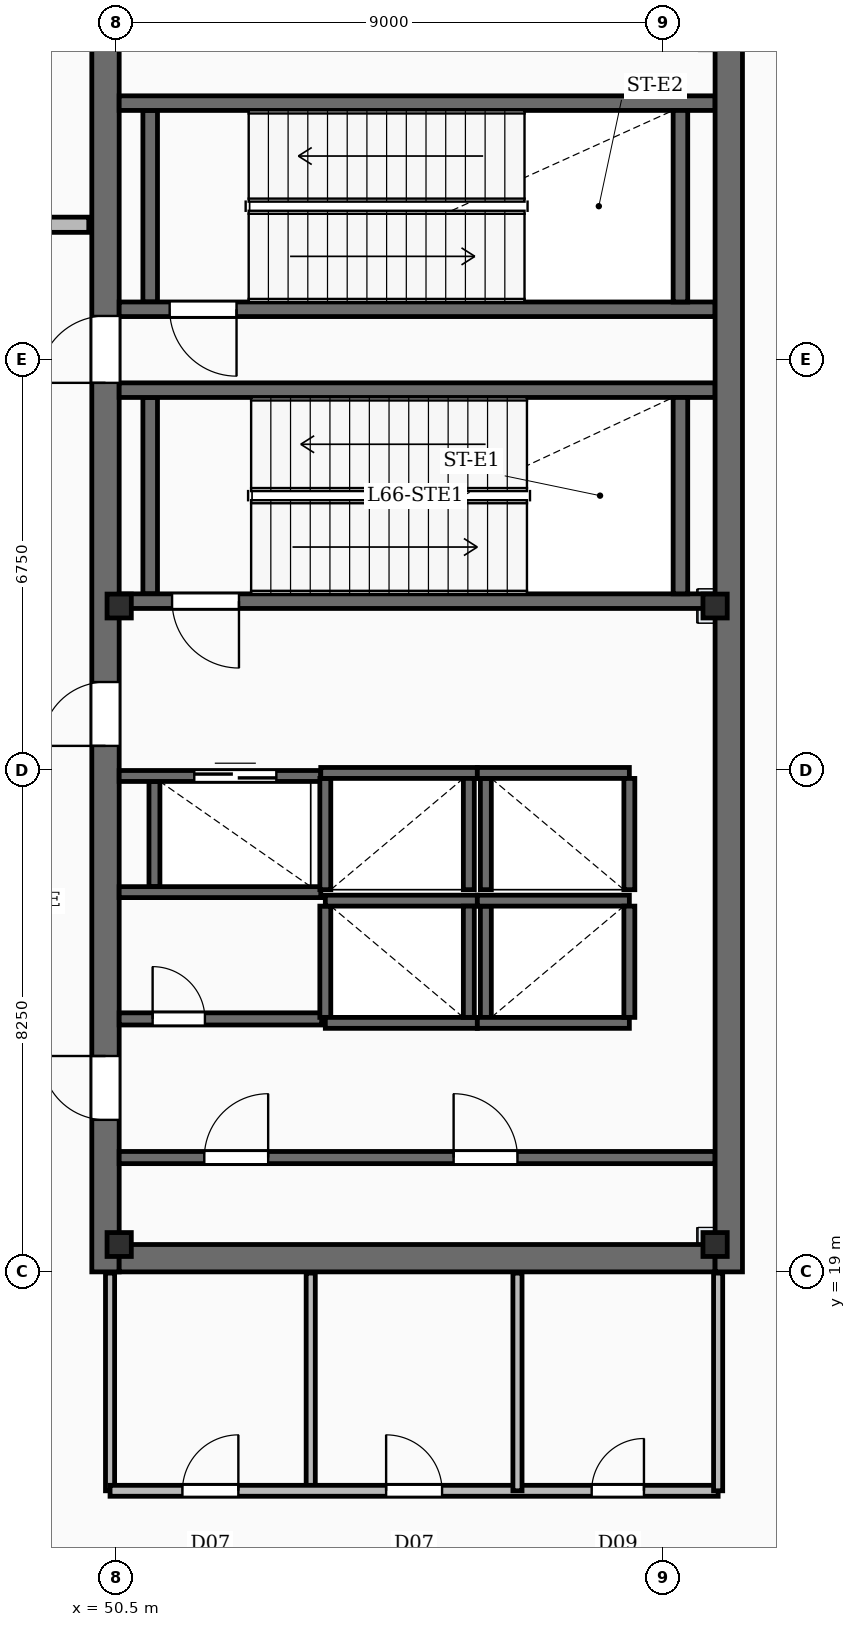
"""IFC4 building model, lengths in metres.
Left out: names, types, materials, properties, quantities, classifications, styles, units other than length and angle.
Written with IfcOpenShell. Run it as: python <this file> out.ifc"""

import sys

from ifc_helpers import new_model, si_unit, direction, frame, frame_2d, origin, origin_2d, place, context, subcontext, project, spatial, rectangle, i_section, extrude, element, fill, save


model = new_model("IFC4")
c1 = context("Model", 3, precision=1e-05, world=origin(), true_north=direction((0.0, 1.0)))
c2 = subcontext(c1, "Body", "Model", "MODEL_VIEW")
j1 = project(units=[si_unit("LENGTHUNIT", "METRE"), si_unit("PLANEANGLEUNIT", "RADIAN")], contexts=[c1])
p1 = place(None, origin())
s1 = spatial("IfcSite", under=j1, at=p1, CompositionType="ELEMENT")
p2 = place(p1, origin())
s2 = spatial("IfcBuilding", under=s1, at=p2, CompositionType="ELEMENT")
p3 = place(p2, frame((0.0, 0.0, 269.7)))
s3 = spatial("IfcBuildingStorey", under=s2, at=p3, CompositionType="ELEMENT", Elevation=269.7)
p4 = place(p3, frame((50.325, 19.0, -0.42), z_axis=(0.0, 0.0, 1.0), x_axis=(0.0, 1.0, 0.0)))
e1 = element("IfcWall", 1, at=p4, inside=s3, PredefinedType="SHEAR", context=c2, shape_type="SweptSolid", body=[
    extrude(rectangle(XDim=20.8, YDim=0.45, at=frame_2d((10.4, 0.0))), origin(), (0.0, 0.0, 1.0), 5.17),
])
p5 = place(p4, frame((2.5, 0.0, 0.42)))
e2 = element("IfcOpeningElement", 2, at=p5, cuts=e1, PredefinedType="OPENING", context=c2, shape_type="SweptSolid", body=[
    extrude(rectangle(XDim=1.05, YDim=2.15, at=frame_2d((0.525, 1.075))), frame((0.0, 0.235, 0.0), z_axis=(0.0, -1.0, 0.0), x_axis=(1.0, 0.0, 0.0)), (0.0, 0.0, 1.0), 0.47),
])
p6 = place(p4, frame((8.65, 0.0, 0.42)))
e3 = element("IfcOpeningElement", 3, at=p6, cuts=e1, PredefinedType="OPENING", context=c2, shape_type="SweptSolid", body=[
    extrude(rectangle(XDim=1.05, YDim=2.15, at=frame_2d((0.525, 1.075))), frame((0.0, 0.235, 0.0), z_axis=(0.0, -1.0, 0.0), x_axis=(1.0, 0.0, 0.0)), (0.0, 0.0, 1.0), 0.47),
])
p7 = place(p4, frame((14.62, 0.0, 0.42)))
e4 = element("IfcOpeningElement", 4, at=p7, cuts=e1, PredefinedType="OPENING", context=c2, shape_type="SweptSolid", body=[
    extrude(rectangle(XDim=1.1, YDim=2.15, at=frame_2d((0.55, 1.075))), frame((0.0, 0.235, 0.0), z_axis=(0.0, -1.0, 0.0), x_axis=(1.0, 0.0, 0.0)), (0.0, 0.0, 1.0), 0.47),
])
p8 = place(p3, frame((60.575, 19.0, -0.42), z_axis=(0.0, 0.0, 1.0), x_axis=(0.0, 1.0, 0.0)))
e5 = element("IfcWall", 5, at=p8, inside=s3, PredefinedType="SHEAR", context=c2, shape_type="SweptSolid", body=[
    extrude(rectangle(XDim=20.8, YDim=0.45, at=frame_2d((10.4, 0.0))), origin(), (0.0, 0.0, 1.0), 5.17),
])
p9 = place(p3, frame((50.55, 19.225, -0.42), z_axis=(0.0, 0.0, 1.0), x_axis=(1.0, 0.0, 0.0)))
e6 = element("IfcWall", 6, at=p9, inside=s3, PredefinedType="SHEAR", context=c2, shape_type="SweptSolid", body=[
    extrude(rectangle(XDim=9.8, YDim=0.45, at=frame_2d((4.9, 0.0))), origin(), (0.0, 0.0, 1.0), 5.17),
])
for number, where, z_axis, x_axis in (
    (7, (50.55, 19.45, -0.42), (0.0, 0.0, 1.0), (1.0, 0.0, 0.0)),
    (8, (60.35, 19.45, -0.42), (0.0, 0.0, 1.0), (1.0, 0.0, 0.0)),
    (9, (50.55, 29.95, -0.42), (0.0, 0.0, 1.0), (1.0, 0.0, 0.0)),
    (10, (60.35, 29.95, -0.42), (0.0, 0.0, 1.0), (1.0, 0.0, 0.0)),
):
    element("IfcColumn", number, at=place(p3, frame(where, z_axis=z_axis, x_axis=x_axis)), inside=s3, PredefinedType="COLUMN", context=c2, shape_type="SweptSolid", body=[
        extrude(i_section(OverallWidth=0.399, OverallDepth=0.393, WebThickness=0.023, FlangeThickness=0.037, FilletRadius=0.02, at=origin_2d()), origin(), (0.0, 0.0, 1.0), 5.17),
    ])
p10 = place(p3, frame((60.35, 30.03, 0.0), z_axis=(0.0, 0.0, 1.0), x_axis=(-1.0, 0.0, 0.0)))
e11 = element("IfcWall", 11, at=p10, inside=s3, PredefinedType="SOLIDWALL", context=c2, shape_type="SweptSolid", body=[
    extrude(rectangle(XDim=9.8, YDim=0.24, at=frame_2d((4.9, 0.0))), origin(), (0.0, 0.0, 1.0), 4.75),
])
p11 = place(p10, frame((7.83, 0.0, 0.0)))
e12 = element("IfcOpeningElement", 12, at=p11, cuts=e11, PredefinedType="OPENING", context=c2, shape_type="SweptSolid", body=[
    extrude(rectangle(XDim=1.1, YDim=2.15, at=frame_2d((0.55, 1.075))), frame((0.0, 0.13, 0.0), z_axis=(0.0, -1.0, 0.0), x_axis=(1.0, 0.0, 0.0)), (0.0, 0.0, 1.0), 0.26),
])
p12 = place(p3, frame((50.55, 33.5, 0.0), z_axis=(0.0, 0.0, 1.0), x_axis=(1.0, 0.0, 0.0)))
e13 = element("IfcWall", 13, at=p12, inside=s3, PredefinedType="SOLIDWALL", context=c2, shape_type="SweptSolid", body=[
    extrude(rectangle(XDim=9.8, YDim=0.24, at=frame_2d((4.9, 0.0))), origin(), (0.0, 0.0, 1.0), 4.75),
])
for number, where, z_axis, x_axis in (
    (14, (51.06, 30.15, 0.0), (0.0, 0.0, 1.0), (0.0, 1.0, 0.0)),
    (15, (59.78, 30.15, 0.0), (0.0, 0.0, 1.0), (0.0, 1.0, 0.0)),
):
    element("IfcWall", number, at=place(p3, frame(where, z_axis=z_axis, x_axis=x_axis)), inside=s3, PredefinedType="SOLIDWALL", context=c2, shape_type="SweptSolid", body=[
        extrude(rectangle(XDim=3.23, YDim=0.24, at=frame_2d((1.615, 0.0))), origin(), (0.0, 0.0, 1.0), 4.75),
    ])
p13 = place(p3, frame((60.35, 34.83, 0.0), z_axis=(0.0, 0.0, 1.0), x_axis=(-1.0, 0.0, 0.0)))
e16 = element("IfcWall", 16, at=p13, inside=s3, PredefinedType="SOLIDWALL", context=c2, shape_type="SweptSolid", body=[
    extrude(rectangle(XDim=9.8, YDim=0.24, at=frame_2d((4.9, 0.0))), origin(), (0.0, 0.0, 1.0), 4.75),
])
p14 = place(p13, frame((7.87, 0.0, 0.0)))
e17 = element("IfcOpeningElement", 17, at=p14, cuts=e16, PredefinedType="OPENING", context=c2, shape_type="SweptSolid", body=[
    extrude(rectangle(XDim=1.1, YDim=2.15, at=frame_2d((0.55, 1.075))), frame((0.0, 0.13, 0.0), z_axis=(0.0, -1.0, 0.0), x_axis=(1.0, 0.0, 0.0)), (0.0, 0.0, 1.0), 0.26),
])
p15 = place(p3, frame((50.55, 38.22, 0.0), z_axis=(0.0, 0.0, 1.0), x_axis=(1.0, 0.0, 0.0)))
e18 = element("IfcWall", 18, at=p15, inside=s3, PredefinedType="SOLIDWALL", context=c2, shape_type="SweptSolid", body=[
    extrude(rectangle(XDim=9.8, YDim=0.24, at=frame_2d((4.9, 0.0))), origin(), (0.0, 0.0, 1.0), 4.75),
])
for number, where, z_axis, x_axis in (
    (19, (51.06, 34.95, 0.0), (0.0, 0.0, 1.0), (0.0, 1.0, 0.0)),
    (20, (59.78, 34.95, 0.0), (0.0, 0.0, 1.0), (0.0, 1.0, 0.0)),
):
    element("IfcWall", number, at=place(p3, frame(where, z_axis=z_axis, x_axis=x_axis)), inside=s3, PredefinedType="SOLIDWALL", context=c2, shape_type="SweptSolid", body=[
        extrude(rectangle(XDim=3.15, YDim=0.24, at=frame_2d((1.575, 0.0))), origin(), (0.0, 0.0, 1.0), 4.75),
    ])
for number, where, z_axis, x_axis in (
    (21, (53.94, 25.105, 0.0), (0.0, 0.0, 1.0), (1.0, 0.0, 0.0)),
    (22, (53.94, 23.095, 0.0), (0.0, 0.0, 1.0), (1.0, 0.0, 0.0)),
):
    element("IfcWall", number, at=place(p3, frame(where, z_axis=z_axis, x_axis=x_axis)), inside=s3, PredefinedType="SOLIDWALL", context=c2, shape_type="SweptSolid", body=[
        extrude(rectangle(XDim=2.5, YDim=0.18, at=frame_2d((1.25, 0.0))), origin(), (0.0, 0.0, 1.0), 4.75),
    ])
for number, where, z_axis, x_axis in (
    (23, (53.94, 23.185, 0.0), (0.0, 0.0, 1.0), (0.0, 1.0, 0.0)),
    (24, (56.3, 23.185, 0.0), (0.0, 0.0, 1.0), (0.0, 1.0, 0.0)),
):
    element("IfcWall", number, at=place(p3, frame(where, z_axis=z_axis, x_axis=x_axis)), inside=s3, PredefinedType="SOLIDWALL", context=c2, shape_type="SweptSolid", body=[
        extrude(rectangle(XDim=1.83, YDim=0.18, at=frame_2d((0.915, 0.0))), origin(), (0.0, 0.0, 1.0), 4.75),
    ])
for number, where, z_axis, x_axis in (
    (25, (56.44, 25.105, 0.0), (0.0, 0.0, 1.0), (1.0, 0.0, 0.0)),
    (26, (56.44, 23.095, 0.0), (0.0, 0.0, 1.0), (1.0, 0.0, 0.0)),
):
    element("IfcWall", number, at=place(p3, frame(where, z_axis=z_axis, x_axis=x_axis)), inside=s3, PredefinedType="SOLIDWALL", context=c2, shape_type="SweptSolid", body=[
        extrude(rectangle(XDim=2.5, YDim=0.18, at=frame_2d((1.25, 0.0))), origin(), (0.0, 0.0, 1.0), 4.75),
    ])
for number, where, z_axis, x_axis in (
    (27, (56.58, 23.185, 0.0), (0.0, 0.0, 1.0), (0.0, 1.0, 0.0)),
    (28, (58.94, 23.185, 0.0), (0.0, 0.0, 1.0), (0.0, 1.0, 0.0)),
):
    element("IfcWall", number, at=place(p3, frame(where, z_axis=z_axis, x_axis=x_axis)), inside=s3, PredefinedType="SOLIDWALL", context=c2, shape_type="SweptSolid", body=[
        extrude(rectangle(XDim=1.83, YDim=0.18, at=frame_2d((0.915, 0.0))), origin(), (0.0, 0.0, 1.0), 4.75),
    ])
p16 = place(p3, frame((53.865, 27.205, 0.0), z_axis=(0.0, 0.0, 1.0), x_axis=(1.0, 0.0, 0.0)))
e29 = element("IfcWall", 29, at=p16, inside=s3, PredefinedType="SOLIDWALL", context=c2, shape_type="SweptSolid", body=[
    extrude(rectangle(XDim=2.575, YDim=0.18, at=frame_2d((1.288, 0.0))), origin(), (0.0, 0.0, 1.0), 4.75),
])
for number, where, z_axis, x_axis in (
    (30, (53.94, 25.285, 0.0), (0.0, 0.0, 1.0), (0.0, 1.0, 0.0)),
    (31, (56.3, 25.285, 0.0), (0.0, 0.0, 1.0), (0.0, 1.0, 0.0)),
):
    element("IfcWall", number, at=place(p3, frame(where, z_axis=z_axis, x_axis=x_axis)), inside=s3, PredefinedType="SOLIDWALL", context=c2, shape_type="SweptSolid", body=[
        extrude(rectangle(XDim=1.83, YDim=0.18, at=frame_2d((0.915, 0.0))), origin(), (0.0, 0.0, 1.0), 4.75),
    ])
p17 = place(p3, frame((56.44, 27.205, 0.0), z_axis=(0.0, 0.0, 1.0), x_axis=(1.0, 0.0, 0.0)))
e32 = element("IfcWall", 32, at=p17, inside=s3, PredefinedType="SOLIDWALL", context=c2, shape_type="SweptSolid", body=[
    extrude(rectangle(XDim=2.5, YDim=0.18, at=frame_2d((1.25, 0.0))), origin(), (0.0, 0.0, 1.0), 4.75),
])
for number, where, z_axis, x_axis in (
    (33, (56.58, 25.285, 0.0), (0.0, 0.0, 1.0), (0.0, 1.0, 0.0)),
    (34, (58.94, 25.285, 0.0), (0.0, 0.0, 1.0), (0.0, 1.0, 0.0)),
):
    element("IfcWall", number, at=place(p3, frame(where, z_axis=z_axis, x_axis=x_axis)), inside=s3, PredefinedType="SOLIDWALL", context=c2, shape_type="SweptSolid", body=[
        extrude(rectangle(XDim=1.83, YDim=0.18, at=frame_2d((0.915, 0.0))), origin(), (0.0, 0.0, 1.0), 4.75),
    ])
p18 = place(p3, frame((50.55, 27.155, 0.0), z_axis=(0.0, 0.0, 1.0), x_axis=(1.0, 0.0, 0.0)))
e35 = element("IfcWall", 35, at=p18, inside=s3, PredefinedType="SOLIDWALL", context=c2, shape_type="SweptSolid", body=[
    extrude(rectangle(XDim=3.315, YDim=0.18, at=frame_2d((1.657, 0.0))), origin(), (0.0, 0.0, 1.0), 4.75),
])
p19 = place(p18, frame((1.235, 0.0, 0.0)))
e36 = element("IfcOpeningElement", 36, at=p19, cuts=e35, PredefinedType="OPENING", context=c2, shape_type="SweptSolid", body=[
    extrude(rectangle(XDim=1.35, YDim=2.3, at=frame_2d((0.675, 1.15))), frame((0.0, 0.1, 0.0), z_axis=(0.0, -1.0, 0.0), x_axis=(1.0, 0.0, 0.0)), (0.0, 0.0, 1.0), 0.2),
])
p20 = place(p3, frame((50.55, 25.245, 0.0), z_axis=(0.0, 0.0, 1.0), x_axis=(1.0, 0.0, 0.0)))
e37 = element("IfcWall", 37, at=p20, inside=s3, PredefinedType="SOLIDWALL", context=c2, shape_type="SweptSolid", body=[
    extrude(rectangle(XDim=3.315, YDim=0.18, at=frame_2d((1.657, 0.0))), origin(), (0.0, 0.0, 1.0), 4.75),
])
p21 = place(p3, frame((51.13, 25.335, 0.0), z_axis=(0.0, 0.0, 1.0), x_axis=(0.0, 1.0, 0.0)))
e38 = element("IfcWall", 38, at=p21, inside=s3, PredefinedType="SOLIDWALL", context=c2, shape_type="SweptSolid", body=[
    extrude(rectangle(XDim=1.73, YDim=0.18, at=frame_2d((0.865, 0.0))), origin(), (0.0, 0.0, 1.0), 4.75),
])
p22 = place(p3, frame((50.55, 20.88, 0.0), z_axis=(0.0, 0.0, 1.0), x_axis=(1.0, 0.0, 0.0)))
e39 = element("IfcWall", 39, at=p22, inside=s3, PredefinedType="SOLIDWALL", context=c2, shape_type="SweptSolid", body=[
    extrude(rectangle(XDim=9.8, YDim=0.2, at=frame_2d((4.9, 0.0))), origin(), (0.0, 0.0, 1.0), 3.81),
])
p23 = place(p22, frame((1.4, 0.0, 0.0)))
e40 = element("IfcOpeningElement", 40, at=p23, cuts=e39, PredefinedType="OPENING", context=c2, shape_type="SweptSolid", body=[
    extrude(rectangle(XDim=1.05, YDim=2.15, at=frame_2d((0.525, 1.075))), frame((0.0, 0.11, 0.0), z_axis=(0.0, -1.0, 0.0), x_axis=(1.0, 0.0, 0.0)), (0.0, 0.0, 1.0), 0.22),
])
p24 = place(p22, frame((5.5, 0.0, 0.0)))
e41 = element("IfcOpeningElement", 41, at=p24, cuts=e39, PredefinedType="OPENING", context=c2, shape_type="SweptSolid", body=[
    extrude(rectangle(XDim=1.05, YDim=2.15, at=frame_2d((0.525, 1.075))), frame((0.0, 0.11, 0.0), z_axis=(0.0, -1.0, 0.0), x_axis=(1.0, 0.0, 0.0)), (0.0, 0.0, 1.0), 0.22),
])
p25 = place(p3, frame((50.55, 23.16, 0.0), z_axis=(0.0, 0.0, 1.0), x_axis=(1.0, 0.0, 0.0)))
e42 = element("IfcWall", 42, at=p25, inside=s3, PredefinedType="SOLIDWALL", context=c2, shape_type="SweptSolid", body=[
    extrude(rectangle(XDim=3.33, YDim=0.2, at=frame_2d((1.665, 0.0))), origin(), (0.0, 0.0, 1.0), 3.81),
])
p26 = place(p25, frame((0.55, 0.0, 0.0)))
e43 = element("IfcOpeningElement", 43, at=p26, cuts=e42, PredefinedType="OPENING", context=c2, shape_type="SweptSolid", body=[
    extrude(rectangle(XDim=0.86, YDim=2.05, at=frame_2d((0.43, 1.025))), frame((0.0, 0.11, 0.0), z_axis=(0.0, -1.0, 0.0), x_axis=(1.0, 0.0, 0.0)), (0.0, 0.0, 1.0), 0.22),
])
for number, where, z_axis, x_axis in (
    (44, (53.7, 15.4, 0.0), (0.0, 0.0, 1.0), (0.0, 1.0, 0.0)),
    (45, (57.1, 15.4, 0.0), (0.0, 0.0, 1.0), (0.0, 1.0, 0.0)),
):
    element("IfcWall", number, at=place(p3, frame(where, z_axis=z_axis, x_axis=x_axis)), inside=s3, PredefinedType="PARTITIONING", context=c2, shape_type="SweptSolid", body=[
        extrude(rectangle(XDim=3.58, YDim=0.15, at=frame_2d((1.79, 0.0))), origin(), (0.0, 0.0, 1.0), 3.81),
    ])
p27 = place(p3, frame((50.4, 15.4, 0.0), z_axis=(0.0, 0.0, 1.0), x_axis=(1.0, 0.0, 0.0)))
e46 = element("IfcWall", 46, at=p27, inside=s3, PredefinedType="SOLIDWALL", context=c2, shape_type="SweptSolid", body=[
    extrude(rectangle(XDim=10.0, YDim=0.18, at=frame_2d((5.0, 0.0))), origin(), (0.0, 0.0, 1.0), 3.81),
])
p28 = place(p27, frame((1.19, 0.0, 0.0)))
e47 = element("IfcOpeningElement", 47, at=p28, cuts=e46, PredefinedType="OPENING", context=c2, shape_type="SweptSolid", body=[
    extrude(rectangle(XDim=0.92, YDim=2.1, at=frame_2d((0.46, 1.05))), frame((0.0, 0.1, 0.0), z_axis=(0.0, -1.0, 0.0), x_axis=(1.0, 0.0, 0.0)), (0.0, 0.0, 1.0), 0.2),
])
p29 = place(p27, frame((4.54, 0.0, 0.0)))
e48 = element("IfcOpeningElement", 48, at=p29, cuts=e46, PredefinedType="OPENING", context=c2, shape_type="SweptSolid", body=[
    extrude(rectangle(XDim=0.92, YDim=2.1, at=frame_2d((0.46, 1.05))), frame((0.0, 0.1, 0.0), z_axis=(0.0, -1.0, 0.0), x_axis=(1.0, 0.0, 0.0)), (0.0, 0.0, 1.0), 0.2),
])
p30 = place(p27, frame((7.92, 0.0, 0.0)))
e49 = element("IfcOpeningElement", 49, at=p30, cuts=e46, PredefinedType="OPENING", context=c2, shape_type="SweptSolid", body=[
    extrude(rectangle(XDim=0.86, YDim=2.05, at=frame_2d((0.43, 1.025))), frame((0.0, 0.1, 0.0), z_axis=(0.0, -1.0, 0.0), x_axis=(1.0, 0.0, 0.0)), (0.0, 0.0, 1.0), 0.2),
])
for number, where, z_axis, x_axis in (
    (50, (50.4, 15.4, 0.0), (0.0, 0.0, 1.0), (0.0, 1.0, 0.0)),
    (51, (60.4, 15.4, 0.0), (0.0, 0.0, 1.0), (0.0, 1.0, 0.0)),
):
    element("IfcWall", number, at=place(p3, frame(where, z_axis=z_axis, x_axis=x_axis)), inside=s3, PredefinedType="PARTITIONING", context=c2, shape_type="SweptSolid", body=[
        extrude(rectangle(XDim=3.58, YDim=0.15, at=frame_2d((1.79, 0.0))), origin(), (0.0, 0.0, 1.0), 2.8),
    ])
p31 = place(p3, frame((24.85, 36.22, 0.0), z_axis=(0.0, 0.0, 1.0), x_axis=(1.0, 0.0, 0.0)))
e52 = element("IfcWall", 52, at=p31, inside=s3, PredefinedType="SOLIDWALL", context=c2, shape_type="SweptSolid", body=[
    extrude(rectangle(XDim=25.2, YDim=0.25, at=frame_2d((12.6, 0.0))), origin(), (0.0, 0.0, 1.0), 3.81),
])
p32 = place(p31, frame((0.55, 0.0, 0.0)))
e53 = element("IfcOpeningElement", 53, at=p32, cuts=e52, PredefinedType="OPENING", context=c2, shape_type="SweptSolid", body=[
    extrude(rectangle(XDim=1.2, YDim=2.2, at=frame_2d((0.6, 1.1))), frame((0.0, 0.135, 0.0), z_axis=(0.0, -1.0, 0.0), x_axis=(1.0, 0.0, 0.0)), (0.0, 0.0, 1.0), 0.27),
])
p33 = place(p5, origin())
e54 = element("IfcDoor", 54, at=p33, inside=s3, OperationType="SINGLE_SWING_RIGHT", PredefinedType="DOOR", context=c2, shape_type="SweptSolid", body=[
    extrude(rectangle(XDim=1.05, YDim=2.15, at=frame_2d((0.525, 1.075))), frame((0.0, 0.025, 0.0), z_axis=(0.0, -1.0, 0.0), x_axis=(1.0, 0.0, 0.0)), (0.0, 0.0, 1.0), 0.05),
])
fill(e2, e54)
p34 = place(p6, origin())
e55 = element("IfcDoor", 55, at=p34, inside=s3, OperationType="SINGLE_SWING_LEFT", PredefinedType="DOOR", context=c2, shape_type="SweptSolid", body=[
    extrude(rectangle(XDim=1.05, YDim=2.15, at=frame_2d((0.525, 1.075))), frame((0.0, 0.025, 0.0), z_axis=(0.0, -1.0, 0.0), x_axis=(1.0, 0.0, 0.0)), (0.0, 0.0, 1.0), 0.05),
])
fill(e3, e55)
p35 = place(p7, origin())
e56 = element("IfcDoor", 56, at=p35, inside=s3, OperationType="SINGLE_SWING_LEFT", PredefinedType="DOOR", context=c2, shape_type="SweptSolid", body=[
    extrude(rectangle(XDim=1.1, YDim=2.15, at=frame_2d((0.55, 1.075))), frame((0.0, 0.025, 0.0), z_axis=(0.0, -1.0, 0.0), x_axis=(1.0, 0.0, 0.0)), (0.0, 0.0, 1.0), 0.05),
])
fill(e4, e56)
p36 = place(p11, origin())
e57 = element("IfcDoor", 57, at=p36, inside=s3, OperationType="SINGLE_SWING_LEFT", PredefinedType="DOOR", context=c2, shape_type="SweptSolid", body=[
    extrude(rectangle(XDim=1.1, YDim=2.15, at=frame_2d((0.55, 1.075))), frame((0.0, 0.025, 0.0), z_axis=(0.0, -1.0, 0.0), x_axis=(1.0, 0.0, 0.0)), (0.0, 0.0, 1.0), 0.05),
])
fill(e12, e57)
p37 = place(p14, origin())
e58 = element("IfcDoor", 58, at=p37, inside=s3, OperationType="SINGLE_SWING_LEFT", PredefinedType="DOOR", context=c2, shape_type="SweptSolid", body=[
    extrude(rectangle(XDim=1.1, YDim=2.15, at=frame_2d((0.55, 1.075))), frame((0.0, 0.025, 0.0), z_axis=(0.0, -1.0, 0.0), x_axis=(1.0, 0.0, 0.0)), (0.0, 0.0, 1.0), 0.05),
])
fill(e17, e58)
p38 = place(p19, origin())
e59 = element("IfcDoor", 59, at=p38, inside=s3, OperationType="DOUBLE_DOOR_SLIDING", PredefinedType="DOOR", context=c2, shape_type="SweptSolid", body=[
    extrude(rectangle(XDim=1.35, YDim=2.3, at=frame_2d((0.675, 1.15))), frame((0.0, 0.025, 0.0), z_axis=(0.0, -1.0, 0.0), x_axis=(1.0, 0.0, 0.0)), (0.0, 0.0, 1.0), 0.05),
])
fill(e36, e59)
p39 = place(p23, origin())
e60 = element("IfcDoor", 60, at=p39, inside=s3, OperationType="SINGLE_SWING_RIGHT", PredefinedType="DOOR", context=c2, shape_type="SweptSolid", body=[
    extrude(rectangle(XDim=1.05, YDim=2.15, at=frame_2d((0.525, 1.075))), frame((0.0, 0.025, 0.0), z_axis=(0.0, -1.0, 0.0), x_axis=(1.0, 0.0, 0.0)), (0.0, 0.0, 1.0), 0.05),
])
fill(e40, e60)
p40 = place(p24, origin())
e61 = element("IfcDoor", 61, at=p40, inside=s3, OperationType="SINGLE_SWING_LEFT", PredefinedType="DOOR", context=c2, shape_type="SweptSolid", body=[
    extrude(rectangle(XDim=1.05, YDim=2.15, at=frame_2d((0.525, 1.075))), frame((0.0, 0.025, 0.0), z_axis=(0.0, -1.0, 0.0), x_axis=(1.0, 0.0, 0.0)), (0.0, 0.0, 1.0), 0.05),
])
fill(e41, e61)
p41 = place(p26, origin())
e62 = element("IfcDoor", 62, at=p41, inside=s3, OperationType="SINGLE_SWING_LEFT", PredefinedType="DOOR", context=c2, shape_type="SweptSolid", body=[
    extrude(rectangle(XDim=0.86, YDim=2.05, at=frame_2d((0.43, 1.025))), frame((0.0, 0.025, 0.0), z_axis=(0.0, -1.0, 0.0), x_axis=(1.0, 0.0, 0.0)), (0.0, 0.0, 1.0), 0.05),
])
fill(e43, e62)
p42 = place(p28, origin())
e63 = element("IfcDoor", 63, at=p42, inside=s3, OperationType="SINGLE_SWING_RIGHT", PredefinedType="DOOR", context=c2, shape_type="SweptSolid", body=[
    extrude(rectangle(XDim=0.92, YDim=2.1, at=frame_2d((0.46, 1.05))), frame((0.0, 0.025, 0.0), z_axis=(0.0, -1.0, 0.0), x_axis=(1.0, 0.0, 0.0)), (0.0, 0.0, 1.0), 0.05),
])
fill(e47, e63)
p43 = place(p29, origin())
e64 = element("IfcDoor", 64, at=p43, inside=s3, OperationType="SINGLE_SWING_LEFT", PredefinedType="DOOR", context=c2, shape_type="SweptSolid", body=[
    extrude(rectangle(XDim=0.92, YDim=2.1, at=frame_2d((0.46, 1.05))), frame((0.0, 0.025, 0.0), z_axis=(0.0, -1.0, 0.0), x_axis=(1.0, 0.0, 0.0)), (0.0, 0.0, 1.0), 0.05),
])
fill(e48, e64)
p44 = place(p30, origin())
e65 = element("IfcDoor", 65, at=p44, inside=s3, OperationType="SINGLE_SWING_RIGHT", PredefinedType="DOOR", context=c2, shape_type="SweptSolid", body=[
    extrude(rectangle(XDim=0.86, YDim=2.05, at=frame_2d((0.43, 1.025))), frame((0.0, 0.025, 0.0), z_axis=(0.0, -1.0, 0.0), x_axis=(1.0, 0.0, 0.0)), (0.0, 0.0, 1.0), 0.05),
])
fill(e49, e65)
save(model, sys.argv[1])
